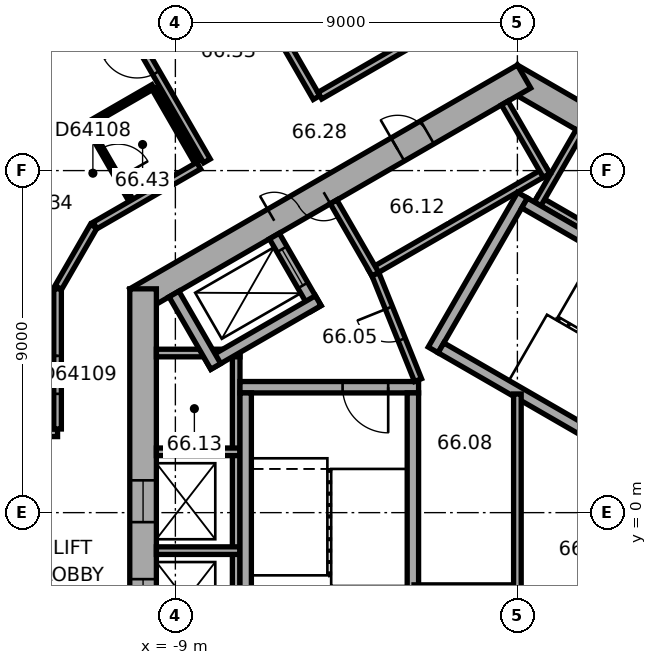
"""IFC4 building model, lengths in metres.
Left out: names, types, materials, properties, quantities, classifications, styles, units other than length and angle.
Written with IfcOpenShell. Run it as: python <this file> out.ifc"""

import sys

from ifc_helpers import new_model, si_unit, direction, frame, frame_2d, origin, place, context, subcontext, project, spatial, rectangle, extrude, element, fill, save


model = new_model("IFC4")
c1 = context("Model", 3, precision=1e-05, world=origin(), true_north=direction((0.0, 1.0)))
c2 = subcontext(c1, "Body", "Model", "MODEL_VIEW")
j1 = project(units=[si_unit("LENGTHUNIT", "METRE"), si_unit("PLANEANGLEUNIT", "RADIAN")], contexts=[c1])
p1 = place(None, origin())
s1 = spatial("IfcSite", under=j1, at=p1, CompositionType="ELEMENT")
p2 = place(p1, origin())
s2 = spatial("IfcBuilding", under=s1, at=p2, CompositionType="ELEMENT")
p3 = place(p2, frame((0.0, 0.0, 267.2)))
s3 = spatial("IfcBuildingStorey", under=s2, at=p3, CompositionType="ELEMENT", Elevation=267.2)
p4 = place(p3, frame((10.025, 5.586, 0.0), z_axis=(0.0, 0.0, 1.0), x_axis=(-0.866026453023, 0.499998182661, 0.0)))
e1 = element("IfcWall", 1, at=p4, inside=s3, PredefinedType="SHEAR", context=c2, shape_type="SweptSolid", body=[
    extrude(rectangle(XDim=11.778, YDim=0.7, at=frame_2d((5.889, 0.0))), origin(), (0.0, 0.0, 1.0), 3.7),
])
p5 = place(p4, frame((5.139, 0.0, 0.0)))
e2 = element("IfcOpeningElement", 2, at=p5, cuts=e1, PredefinedType="OPENING", context=c2, shape_type="SweptSolid", body=[
    extrude(rectangle(XDim=0.9, YDim=2.1, at=frame_2d((0.45, 1.05))), frame((0.0, 0.36, 0.0), z_axis=(0.0, -1.0, 0.0), x_axis=(1.0, 0.0, 0.0)), (0.0, 0.0, 1.0), 0.72),
])
p6 = place(p3, frame((0.175, 11.475, 0.0), z_axis=(0.0, 0.0, 1.0), x_axis=(-0.866026453023, -0.499998182661, 0.0)))
e3 = element("IfcWall", 3, at=p6, inside=s3, PredefinedType="SHEAR", context=c2, shape_type="SweptSolid", body=[
    extrude(rectangle(XDim=11.778, YDim=0.7, at=frame_2d((5.889, 0.0))), origin(), (0.0, 0.0, 1.0), 3.7),
])
p7 = place(p6, frame((6.089, 0.0, 0.0)))
e4 = element("IfcOpeningElement", 4, at=p7, cuts=e3, PredefinedType="OPENING", context=c2, shape_type="SweptSolid", body=[
    extrude(rectangle(XDim=1.5, YDim=2.1, at=frame_2d((0.75, 1.05))), frame((0.0, 0.36, 0.0), z_axis=(0.0, -1.0, 0.0), x_axis=(1.0, 0.0, 0.0)), (0.0, 0.0, 1.0), 0.72),
])
p8 = place(p6, frame((2.939, 0.0, 0.0)))
e5 = element("IfcOpeningElement", 5, at=p8, cuts=e3, PredefinedType="OPENING", context=c2, shape_type="SweptSolid", body=[
    extrude(rectangle(XDim=0.9, YDim=2.1, at=frame_2d((0.45, 1.05))), frame((0.0, 0.36, 0.0), z_axis=(0.0, -1.0, 0.0), x_axis=(1.0, 0.0, 0.0)), (0.0, 0.0, 1.0), 0.72),
])
p9 = place(p3, frame((-9.85, 5.889, 0.0), z_axis=(0.0, 0.0, 1.0), x_axis=(0.0, -1.0, 0.0)))
e6 = element("IfcWall", 6, at=p9, inside=s3, PredefinedType="SHEAR", context=c2, shape_type="SweptSolid", body=[
    extrude(rectangle(XDim=11.778, YDim=0.7, at=frame_2d((5.889, 0.0))), origin(), (0.0, 0.0, 1.0), 3.7),
])
p10 = place(p9, frame((5.039, 0.0, 0.0)))
e7 = element("IfcOpeningElement", 7, at=p10, cuts=e6, PredefinedType="OPENING", context=c2, shape_type="SweptSolid", body=[
    extrude(rectangle(XDim=1.1, YDim=2.1, at=frame_2d((0.55, 1.05))), frame((0.0, 0.36, 0.0), z_axis=(0.0, -1.0, 0.0), x_axis=(1.0, 0.0, 0.0)), (0.0, 0.0, 1.0), 0.72),
])
p11 = place(p9, frame((7.639, 0.0, 0.0)))
e8 = element("IfcOpeningElement", 8, at=p11, cuts=e6, PredefinedType="OPENING", context=c2, shape_type="SweptSolid", body=[
    extrude(rectangle(XDim=1.1, YDim=2.1, at=frame_2d((0.55, 1.05))), frame((0.0, 0.36, 0.0), z_axis=(0.0, -1.0, 0.0), x_axis=(1.0, 0.0, 0.0)), (0.0, 0.0, 1.0), 0.72),
])
p12 = place(p3, frame((-2.624, 20.713, 0.0), z_axis=(0.0, 0.0, 1.0), x_axis=(-0.866026460444, -0.499998169808, 0.0)))
e9 = element("IfcWall", 9, at=p12, inside=s3, PredefinedType="STANDARD", context=c2, shape_type="SweptSolid", body=[
    extrude(rectangle(XDim=17.731, YDim=0.2, at=frame_2d((8.866, 0.0))), origin(), (0.0, 0.0, 1.0), 3.7),
])
p13 = place(p12, frame((1.203, 0.0, 0.9)))
e10 = element("IfcOpeningElement", 10, at=p13, cuts=e9, PredefinedType="OPENING", context=c2, shape_type="SweptSolid", body=[
    extrude(rectangle(XDim=2.0, YDim=2.0, at=frame_2d((1.0, 1.0))), frame((0.0, 0.11, 0.0), z_axis=(0.0, -1.0, 0.0), x_axis=(1.0, 0.0, 0.0)), (0.0, 0.0, 1.0), 0.22),
])
p14 = place(p12, frame((4.535, 0.0, 0.9)))
e11 = element("IfcOpeningElement", 11, at=p14, cuts=e9, PredefinedType="OPENING", context=c2, shape_type="SweptSolid", body=[
    extrude(rectangle(XDim=2.0, YDim=2.0, at=frame_2d((1.0, 1.0))), frame((0.0, 0.11, 0.0), z_axis=(0.0, -1.0, 0.0), x_axis=(1.0, 0.0, 0.0)), (0.0, 0.0, 1.0), 0.22),
])
p15 = place(p12, frame((7.867, 0.0, 0.9)))
e12 = element("IfcOpeningElement", 12, at=p15, cuts=e9, PredefinedType="OPENING", context=c2, shape_type="SweptSolid", body=[
    extrude(rectangle(XDim=2.0, YDim=2.0, at=frame_2d((1.0, 1.0))), frame((0.0, 0.11, 0.0), z_axis=(0.0, -1.0, 0.0), x_axis=(1.0, 0.0, 0.0)), (0.0, 0.0, 1.0), 0.22),
])
p16 = place(p12, frame((11.198, 0.0, 0.9)))
e13 = element("IfcOpeningElement", 13, at=p16, cuts=e9, PredefinedType="OPENING", context=c2, shape_type="SweptSolid", body=[
    extrude(rectangle(XDim=2.0, YDim=2.0, at=frame_2d((1.0, 1.0))), frame((0.0, 0.11, 0.0), z_axis=(0.0, -1.0, 0.0), x_axis=(1.0, 0.0, 0.0)), (0.0, 0.0, 1.0), 0.22),
])
p17 = place(p12, frame((14.53, 0.0, 0.9)))
e14 = element("IfcOpeningElement", 14, at=p17, cuts=e9, PredefinedType="OPENING", context=c2, shape_type="SweptSolid", body=[
    extrude(rectangle(XDim=2.0, YDim=2.0, at=frame_2d((1.0, 1.0))), frame((0.0, 0.11, 0.0), z_axis=(0.0, -1.0, 0.0), x_axis=(1.0, 0.0, 0.0)), (0.0, 0.0, 1.0), 0.22),
])
p18 = place(p3, frame((7.424, 4.259, 0.0), z_axis=(0.0, 0.0, 1.0), x_axis=(-0.866026010844, 0.49999894854, 0.0)))
e15 = element("IfcWall", 15, at=p18, inside=s3, PredefinedType="PARTITIONING", context=c2, shape_type="SweptSolid", body=[
    extrude(rectangle(XDim=8.0, YDim=0.2, at=frame_2d((4.0, 0.0))), origin(), (0.0, 0.0, 1.0), 3.42),
])
p19 = place(p3, frame((0.532, 8.122, 0.0), z_axis=(0.0, 0.0, 1.0), x_axis=(0.500077893725, 0.86598042715, 0.0)))
e16 = element("IfcWall", 16, at=p19, inside=s3, PredefinedType="PARTITIONING", context=c2, shape_type="SweptSolid", body=[
    extrude(rectangle(XDim=2.2, YDim=0.2, at=frame_2d((1.1, 0.0))), origin(), (0.0, 0.0, 1.0), 3.42),
])
p20 = place(p3, frame((0.803, 9.009, 0.0), z_axis=(0.0, 0.0, 1.0), x_axis=(-0.866028230842, -0.499995103361, 0.0)))
e17 = element("IfcWall", 17, at=p20, inside=s3, PredefinedType="PARTITIONING", context=c2, shape_type="SweptSolid", body=[
    extrude(rectangle(XDim=5.4, YDim=0.2, at=frame_2d((2.7, 0.0))), origin(), (0.0, 0.0, 1.0), 3.42),
])
p21 = place(p3, frame((0.767, 8.872, 0.0), z_axis=(0.0, 0.0, 1.0), x_axis=(-0.499994660107, 0.866028486751, 0.0)))
e18 = element("IfcWall", 18, at=p21, inside=s3, PredefinedType="PARTITIONING", context=c2, shape_type="SweptSolid", body=[
    extrude(rectangle(XDim=2.2, YDim=0.2, at=frame_2d((1.1, 0.0))), origin(), (0.0, 0.0, 1.0), 3.42),
])
p22 = place(p3, frame((-3.737, 6.272, 0.0), z_axis=(0.0, 0.0, 1.0), x_axis=(-0.50002983664, 0.866008176907, 0.0)))
e19 = element("IfcWall", 19, at=p22, inside=s3, PredefinedType="PARTITIONING", context=c2, shape_type="SweptSolid", body=[
    extrude(rectangle(XDim=2.2, YDim=0.2, at=frame_2d((1.1, 0.0))), origin(), (0.0, 0.0, 1.0), 3.42),
])
p23 = place(p3, frame((-7.4, 4.3, 0.0), z_axis=(0.0, 0.0, 1.0), x_axis=(0.0, -1.0, 0.0)))
e20 = element("IfcWall", 20, at=p23, inside=s3, PredefinedType="PARTITIONING", context=c2, shape_type="SweptSolid", body=[
    extrude(rectangle(XDim=8.0, YDim=0.2, at=frame_2d((4.0, 0.0))), origin(), (0.0, 0.0, 1.0), 3.42),
])
for number, where, z_axis, x_axis in (
    (21, (-7.3, 4.2, 0.0), (0.0, 0.0, 1.0), (-1.0, 0.0, 0.0)),
    (22, (-7.3, 1.6, 0.0), (0.0, 0.0, 1.0), (-1.0, 0.0, 0.0)),
    (23, (-7.3, -1.0, 0.0), (0.0, 0.0, 1.0), (-1.0, 0.0, 0.0)),
):
    element("IfcWall", number, at=place(p3, frame(where, z_axis=z_axis, x_axis=x_axis)), inside=s3, PredefinedType="PARTITIONING", context=c2, shape_type="SweptSolid", body=[
        extrude(rectangle(XDim=2.2, YDim=0.2, at=frame_2d((1.1, 0.0))), origin(), (0.0, 0.0, 1.0), 3.42),
    ])
p24 = place(p3, frame((-2.216, 4.282, 0.0), z_axis=(0.0, 0.0, 1.0), x_axis=(0.499977259774, 0.866038532462, 0.0)))
e24 = element("IfcWall", 24, at=p24, inside=s3, PredefinedType="SHEAR", context=c2, shape_type="SweptSolid", body=[
    extrude(rectangle(XDim=4.7, YDim=0.3, at=frame_2d((2.35, 0.0))), origin(), (0.0, 0.0, 1.0), 3.42),
])
for number, where, z_axis, x_axis in (
    (25, (4.103, 0.807, 0.0), (0.0, 0.0, 1.0), (-0.866, 0.5, 0.0)),
    (26, (6.303, 4.617, 0.0), (0.0, 0.0, 1.0), (-0.866, 0.5, 0.0)),
):
    element("IfcWall", number, at=place(p3, frame(where, z_axis=z_axis, x_axis=x_axis)), inside=s3, PredefinedType="SHEAR", context=c2, shape_type="SweptSolid", body=[
        extrude(rectangle(XDim=7.06, YDim=0.3, at=frame_2d((3.53, 0.0))), origin(), (0.0, 0.0, 1.0), 3.42),
    ])
p25 = place(p3, frame((-2.6, 3.3, 0.0), z_axis=(0.0, 0.0, 1.0), x_axis=(-1.0, 0.0, 0.0)))
e27 = element("IfcWall", 27, at=p25, inside=s3, PredefinedType="SHEAR", context=c2, shape_type="SweptSolid", body=[
    extrude(rectangle(XDim=4.7, YDim=0.3, at=frame_2d((2.35, 0.0))), origin(), (0.0, 0.0, 1.0), 3.42),
])
p26 = place(p25, frame((0.8, 0.0, 0.0)))
e28 = element("IfcOpeningElement", 28, at=p26, cuts=e27, PredefinedType="OPENING", context=c2, shape_type="SweptSolid", body=[
    extrude(rectangle(XDim=1.2, YDim=2.1, at=frame_2d((0.6, 1.05))), frame((0.0, 0.16, 0.0), z_axis=(0.0, -1.0, 0.0), x_axis=(1.0, 0.0, 0.0)), (0.0, 0.0, 1.0), 0.32),
])
for number, where, z_axis, x_axis in (
    (29, (-2.75, 3.15, 0.0), (0.0, 0.0, 1.0), (0.0, -1.0, 0.0)),
    (30, (-7.15, 3.15, 0.0), (0.0, 0.0, 1.0), (0.0, -1.0, 0.0)),
):
    element("IfcWall", number, at=place(p3, frame(where, z_axis=z_axis, x_axis=x_axis)), inside=s3, PredefinedType="SHEAR", context=c2, shape_type="SweptSolid", body=[
        extrude(rectangle(XDim=7.06, YDim=0.3, at=frame_2d((3.53, 0.0))), origin(), (0.0, 0.0, 1.0), 3.42),
    ])
p27 = place(p3, frame((-1.353, -3.957, 0.0), z_axis=(0.0, 0.0, 1.0), x_axis=(0.866027801685, 0.499995846692, 0.0)))
e31 = element("IfcWall", 31, at=p27, inside=s3, PredefinedType="SHEAR", context=c2, shape_type="SweptSolid", body=[
    extrude(rectangle(XDim=7.06, YDim=0.3, at=frame_2d((3.53, 0.0))), origin(), (0.0, 0.0, 1.0), 3.42),
])
p28 = place(p3, frame((-5.295, 5.372, 0.0), z_axis=(0.0, 0.0, 1.0), x_axis=(-0.500077893725, 0.86598042715, 0.0)))
e32 = element("IfcWall", 32, at=p28, inside=s3, PredefinedType="SHEAR", context=c2, shape_type="SweptSolid", body=[
    extrude(rectangle(XDim=2.2, YDim=0.3, at=frame_2d((1.1, 0.0))), origin(), (0.0, 0.0, 1.0), 3.42),
])
p29 = place(p28, frame((0.7, 0.0, 0.0)))
e33 = element("IfcOpeningElement", 33, at=p29, cuts=e32, PredefinedType="OPENING", context=c2, shape_type="SweptSolid", body=[
    extrude(rectangle(XDim=1.1, YDim=2.1, at=frame_2d((0.55, 1.05))), frame((0.0, 0.16, 0.0), z_axis=(0.0, -1.0, 0.0), x_axis=(1.0, 0.0, 0.0)), (0.0, 0.0, 1.0), 0.32),
])
p30 = place(p3, frame((-5.24, 5.577, 0.0), z_axis=(0.0, 0.0, 1.0), x_axis=(-0.866014461049, -0.500018952895, 0.0)))
e34 = element("IfcWall", 34, at=p30, inside=s3, PredefinedType="SHEAR", context=c2, shape_type="SweptSolid", body=[
    extrude(rectangle(XDim=3.35, YDim=0.3, at=frame_2d((1.675, 0.0))), origin(), (0.0, 0.0, 1.0), 3.42),
])
p31 = place(p3, frame((-7.937, 3.847, 0.0), z_axis=(0.0, 0.0, 1.0), x_axis=(-0.50002983664, 0.866008176907, 0.0)))
e35 = element("IfcWall", 35, at=p31, inside=s3, PredefinedType="SHEAR", context=c2, shape_type="SweptSolid", body=[
    extrude(rectangle(XDim=2.2, YDim=0.3, at=frame_2d((1.1, 0.0))), origin(), (0.0, 0.0, 1.0), 3.42),
])
p32 = place(p3, frame((-2.615, 3.487, 0.0), z_axis=(0.0, 0.0, 1.0), x_axis=(-0.373576831041, 0.92759924068, 0.0)))
e36 = element("IfcWall", 36, at=p32, inside=s3, PredefinedType="PARTITIONING", context=c2, shape_type="SweptSolid", body=[
    extrude(rectangle(XDim=3.002, YDim=0.2, at=frame_2d((1.501, 0.0))), origin(), (0.0, 0.0, 1.0), 3.42),
])
p33 = place(p32, frame((1.15, 0.0, 0.0)))
e37 = element("IfcOpeningElement", 37, at=p33, cuts=e36, PredefinedType="OPENING", context=c2, shape_type="SweptSolid", body=[
    extrude(rectangle(XDim=0.9, YDim=2.1, at=frame_2d((0.45, 1.05))), frame((0.0, 0.11, 0.0), z_axis=(0.0, -1.0, 0.0), x_axis=(1.0, 0.0, 0.0)), (0.0, 0.0, 1.0), 0.22),
])
p34 = place(p3, frame((0.0, -3.122, 0.0), z_axis=(0.0, 0.0, 1.0), x_axis=(0.0, 1.0, 0.0)))
e38 = element("IfcWall", 38, at=p34, inside=s3, PredefinedType="PARTITIONING", context=c2, shape_type="SweptSolid", body=[
    extrude(rectangle(XDim=6.245, YDim=0.2, at=frame_2d((3.122, 0.0))), origin(), (0.0, 0.0, 1.0), 3.42),
])
p35 = place(p3, frame((-18.768, 4.643, 0.0), z_axis=(0.0, 0.0, 1.0), x_axis=(0.99813496285, 0.0610458511, 0.0)))
e39 = element("IfcWall", 39, at=p35, inside=s3, PredefinedType="PARTITIONING", context=c2, shape_type="SweptSolid", body=[
    extrude(rectangle(XDim=6.571, YDim=0.2, at=frame_2d((3.285, 0.0))), origin(), (0.0, 0.0, 1.0), 3.42),
])
p36 = place(p3, frame((-12.1, 2.101, 0.0), z_axis=(0.0, 0.0, 1.0), x_axis=(-1.0, 0.0, 0.0)))
e40 = element("IfcWall", 40, at=p36, inside=s3, PredefinedType="PARTITIONING", context=c2, shape_type="SweptSolid", body=[
    extrude(rectangle(XDim=1.101, YDim=0.2, at=frame_2d((0.55, 0.0))), origin(), (0.0, 0.0, 1.0), 3.42),
])
p37 = place(p3, frame((-12.1, 5.889, 0.0), z_axis=(0.0, 0.0, 1.0), x_axis=(0.0, -1.0, 0.0)))
e41 = element("IfcWall", 41, at=p37, inside=s3, PredefinedType="PARTITIONING", context=c2, shape_type="SweptSolid", body=[
    extrude(rectangle(XDim=3.688, YDim=0.2, at=frame_2d((1.844, 0.0))), origin(), (0.0, 0.0, 1.0), 3.42),
])
p38 = place(p37, frame((1.763, 0.0, 0.0)))
e42 = element("IfcOpeningElement", 42, at=p38, cuts=e41, PredefinedType="OPENING", context=c2, shape_type="SweptSolid", body=[
    extrude(rectangle(XDim=1.0, YDim=2.1, at=frame_2d((0.5, 1.05))), frame((0.0, 0.11, 0.0), z_axis=(0.0, -1.0, 0.0), x_axis=(1.0, 0.0, 0.0)), (0.0, 0.0, 1.0), 0.22),
])
p39 = place(p3, frame((-11.345, 14.754, 0.0), z_axis=(0.0, 0.0, 1.0), x_axis=(0.500005339912, -0.866022320763, 0.0)))
e43 = element("IfcWall", 43, at=p39, inside=s3, PredefinedType="PARTITIONING", context=c2, shape_type="SweptSolid", body=[
    extrude(rectangle(XDim=6.35, YDim=0.2, at=frame_2d((3.175, 0.0))), origin(), (0.0, 0.0, 1.0), 3.42),
])
p40 = place(p39, frame((2.675, 0.0, 0.0)))
e44 = element("IfcOpeningElement", 44, at=p40, cuts=e43, PredefinedType="OPENING", context=c2, shape_type="SweptSolid", body=[
    extrude(rectangle(XDim=1.0, YDim=2.1, at=frame_2d((0.5, 1.05))), frame((0.0, 0.11, 0.0), z_axis=(0.0, -1.0, 0.0), x_axis=(1.0, 0.0, 0.0)), (0.0, 0.0, 1.0), 0.22),
])
p41 = place(p3, frame((-11.319, 10.208, 0.0), z_axis=(0.0, 0.0, 1.0), x_axis=(0.866010750942, 0.50002537861, 0.0)))
e45 = element("IfcWall", 45, at=p41, inside=s3, PredefinedType="PARTITIONING", context=c2, shape_type="SweptSolid", body=[
    extrude(rectangle(XDim=2.0, YDim=0.12, at=frame_2d((1.0, 0.0))), origin(), (0.0, 0.0, 1.0), 3.42),
])
p42 = place(p3, frame((-11.15, 7.534, 0.0), z_axis=(0.0, 0.0, 1.0), x_axis=(-0.500063286585, -0.865988862174, 0.0)))
e46 = element("IfcWall", 46, at=p42, inside=s3, PredefinedType="PARTITIONING", context=c2, shape_type="SweptSolid", body=[
    extrude(rectangle(XDim=1.86, YDim=0.2, at=frame_2d((0.93, 0.0))), origin(), (0.0, 0.0, 1.0), 3.42),
])
p43 = place(p3, frame((-10.169, 8.216, 0.0), z_axis=(0.0, 0.0, 1.0), x_axis=(-0.500030632641, 0.866007717299, 0.0)))
e47 = element("IfcWall", 47, at=p43, inside=s3, PredefinedType="PARTITIONING", context=c2, shape_type="SweptSolid", body=[
    extrude(rectangle(XDim=2.24, YDim=0.12, at=frame_2d((1.12, 0.0))), origin(), (0.0, 0.0, 1.0), 3.42),
])
p44 = place(p43, frame((0.67, 0.0, 0.0)))
e48 = element("IfcOpeningElement", 48, at=p44, cuts=e47, PredefinedType="OPENING", context=c2, shape_type="SweptSolid", body=[
    extrude(rectangle(XDim=0.9, YDim=2.1, at=frame_2d((0.45, 1.05))), frame((0.0, 0.07, 0.0), z_axis=(0.0, -1.0, 0.0), x_axis=(1.0, 0.0, 0.0)), (0.0, 0.0, 1.0), 0.14),
])
p45 = place(p3, frame((-9.557, 11.156, 0.0), z_axis=(0.0, 0.0, 1.0), x_axis=(0.49994888933, -0.866054910533, 0.0)))
e49 = element("IfcWall", 49, at=p45, inside=s3, PredefinedType="PARTITIONING", context=c2, shape_type="SweptSolid", body=[
    extrude(rectangle(XDim=2.24, YDim=0.12, at=frame_2d((1.12, 0.0))), origin(), (0.0, 0.0, 1.0), 3.42),
])
p46 = place(p3, frame((-8.46, 16.42, 0.0), z_axis=(0.0, 0.0, 1.0), x_axis=(0.500005339912, -0.866022320763, 0.0)))
e50 = element("IfcWall", 50, at=p46, inside=s3, PredefinedType="PARTITIONING", context=c2, shape_type="SweptSolid", body=[
    extrude(rectangle(XDim=6.35, YDim=0.2, at=frame_2d((3.175, 0.0))), origin(), (0.0, 0.0, 1.0), 2.87),
])
p47 = place(p46, frame((2.675, 0.0, 0.0)))
e51 = element("IfcOpeningElement", 51, at=p47, cuts=e50, PredefinedType="OPENING", context=c2, shape_type="SweptSolid", body=[
    extrude(rectangle(XDim=1.0, YDim=2.1, at=frame_2d((0.5, 1.05))), frame((0.0, 0.11, 0.0), z_axis=(0.0, -1.0, 0.0), x_axis=(1.0, 0.0, 0.0)), (0.0, 0.0, 1.0), 0.22),
])
p48 = place(p3, frame((-8.387, 9.13, 0.0), z_axis=(0.0, 0.0, 1.0), x_axis=(-0.866026878644, -0.499997445459, 0.0)))
e52 = element("IfcWall", 52, at=p48, inside=s3, PredefinedType="PARTITIONING", context=c2, shape_type="SweptSolid", body=[
    extrude(rectangle(XDim=3.151, YDim=0.2, at=frame_2d((1.575, 0.0))), origin(), (0.0, 0.0, 1.0), 3.42),
])
p49 = place(p3, frame((-0.95, 13.423, 0.0), z_axis=(0.0, 0.0, 1.0), x_axis=(-0.86603557629, -0.499982380289, 0.0)))
e53 = element("IfcWall", 53, at=p49, inside=s3, PredefinedType="PARTITIONING", context=c2, shape_type="SweptSolid", body=[
    extrude(rectangle(XDim=4.906, YDim=0.2, at=frame_2d((2.453, 0.0))), origin(), (0.0, 0.0, 1.0), 3.42),
])
p50 = place(p3, frame((11.15, 7.534, 0.0), z_axis=(0.0, 0.0, 1.0), x_axis=(-0.866026603062, 0.499997922785, 0.0)))
e54 = element("IfcWall", 54, at=p50, inside=s3, PredefinedType="PARTITIONING", context=c2, shape_type="SweptSolid", body=[
    extrude(rectangle(XDim=11.738, YDim=0.2, at=frame_2d((5.869, 0.0))), origin(), (0.0, 0.0, 1.0), 3.42),
])
p51 = place(p50, frame((5.345, 0.0, 0.0)))
e55 = element("IfcOpeningElement", 55, at=p51, cuts=e54, PredefinedType="OPENING", context=c2, shape_type="SweptSolid", body=[
    extrude(rectangle(XDim=1.0, YDim=2.1, at=frame_2d((0.5, 1.05))), frame((0.0, 0.11, 0.0), z_axis=(0.0, -1.0, 0.0), x_axis=(1.0, 0.0, 0.0)), (0.0, 0.0, 1.0), 0.22),
])
p52 = place(p7, origin())
e56 = element("IfcDoor", 56, at=p52, inside=s3, OperationType="DOUBLE_DOOR_SINGLE_SWING", PredefinedType="DOOR", context=c2, shape_type="SweptSolid", body=[
    extrude(rectangle(XDim=1.5, YDim=2.1, at=frame_2d((0.75, 1.05))), frame((0.0, 0.025, 0.0), z_axis=(0.0, -1.0, 0.0), x_axis=(1.0, 0.0, 0.0)), (0.0, 0.0, 1.0), 0.05),
])
fill(e4, e56)
p53 = place(p26, origin())
e57 = element("IfcDoor", 57, at=p53, inside=s3, OperationType="SINGLE_SWING_RIGHT", PredefinedType="DOOR", context=c2, shape_type="SweptSolid", body=[
    extrude(rectangle(XDim=1.2, YDim=2.1, at=frame_2d((0.6, 1.05))), frame((0.0, 0.025, 0.0), z_axis=(0.0, -1.0, 0.0), x_axis=(1.0, 0.0, 0.0)), (0.0, 0.0, 1.0), 0.05),
])
fill(e28, e57)
p54 = place(p33, origin())
e58 = element("IfcDoor", 58, at=p54, inside=s3, OperationType="SINGLE_SWING_LEFT", PredefinedType="DOOR", context=c2, shape_type="SweptSolid", body=[
    extrude(rectangle(XDim=0.9, YDim=2.1, at=frame_2d((0.45, 1.05))), frame((0.0, 0.025, 0.0), z_axis=(0.0, -1.0, 0.0), x_axis=(1.0, 0.0, 0.0)), (0.0, 0.0, 1.0), 0.05),
])
fill(e37, e58)
p55 = place(p8, origin())
e59 = element("IfcDoor", 59, at=p55, inside=s3, OperationType="SINGLE_SWING_LEFT", PredefinedType="DOOR", context=c2, shape_type="SweptSolid", body=[
    extrude(rectangle(XDim=0.9, YDim=2.1, at=frame_2d((0.45, 1.05))), frame((0.0, 0.025, 0.0), z_axis=(0.0, -1.0, 0.0), x_axis=(1.0, 0.0, 0.0)), (0.0, 0.0, 1.0), 0.05),
])
fill(e5, e59)
p56 = place(p29, origin())
e60 = element("IfcDoor", 60, at=p56, inside=s3, OperationType="DOUBLE_DOOR_SLIDING", PredefinedType="DOOR", context=c2, shape_type="SweptSolid", body=[
    extrude(rectangle(XDim=1.1, YDim=2.1, at=frame_2d((0.55, 1.05))), frame((0.0, 0.025, 0.0), z_axis=(0.0, -1.0, 0.0), x_axis=(1.0, 0.0, 0.0)), (0.0, 0.0, 1.0), 0.05),
])
fill(e33, e60)
p57 = place(p10, origin())
e61 = element("IfcDoor", 61, at=p57, inside=s3, OperationType="DOUBLE_DOOR_SLIDING", PredefinedType="DOOR", context=c2, shape_type="SweptSolid", body=[
    extrude(rectangle(XDim=1.1, YDim=2.1, at=frame_2d((0.55, 1.05))), frame((0.0, 0.025, 0.0), z_axis=(0.0, -1.0, 0.0), x_axis=(1.0, 0.0, 0.0)), (0.0, 0.0, 1.0), 0.05),
])
fill(e7, e61)
p58 = place(p11, origin())
e62 = element("IfcDoor", 62, at=p58, inside=s3, OperationType="DOUBLE_DOOR_SLIDING", PredefinedType="DOOR", context=c2, shape_type="SweptSolid", body=[
    extrude(rectangle(XDim=1.1, YDim=2.1, at=frame_2d((0.55, 1.05))), frame((0.0, 0.025, 0.0), z_axis=(0.0, -1.0, 0.0), x_axis=(1.0, 0.0, 0.0)), (0.0, 0.0, 1.0), 0.05),
])
fill(e8, e62)
p59 = place(p40, origin())
e63 = element("IfcDoor", 63, at=p59, inside=s3, OperationType="SINGLE_SWING_LEFT", PredefinedType="DOOR", context=c2, shape_type="SweptSolid", body=[
    extrude(rectangle(XDim=1.0, YDim=2.1, at=frame_2d((0.5, 1.05))), frame((0.0, 0.025, 0.0), z_axis=(0.0, -1.0, 0.0), x_axis=(1.0, 0.0, 0.0)), (0.0, 0.0, 1.0), 0.05),
])
fill(e44, e63)
p60 = place(p44, origin())
e64 = element("IfcDoor", 64, at=p60, inside=s3, OperationType="SINGLE_SWING_LEFT", PredefinedType="DOOR", context=c2, shape_type="SweptSolid", body=[
    extrude(rectangle(XDim=0.9, YDim=2.1, at=frame_2d((0.45, 1.05))), frame((0.0, 0.025, 0.0), z_axis=(0.0, -1.0, 0.0), x_axis=(1.0, 0.0, 0.0)), (0.0, 0.0, 1.0), 0.05),
])
fill(e48, e64)
p61 = place(p38, origin())
e65 = element("IfcDoor", 65, at=p61, inside=s3, OperationType="SINGLE_SWING_LEFT", PredefinedType="DOOR", context=c2, shape_type="SweptSolid", body=[
    extrude(rectangle(XDim=1.0, YDim=2.1, at=frame_2d((0.5, 1.05))), frame((0.0, 0.025, 0.0), z_axis=(0.0, -1.0, 0.0), x_axis=(1.0, 0.0, 0.0)), (0.0, 0.0, 1.0), 0.05),
])
fill(e42, e65)
save(model, sys.argv[1])
